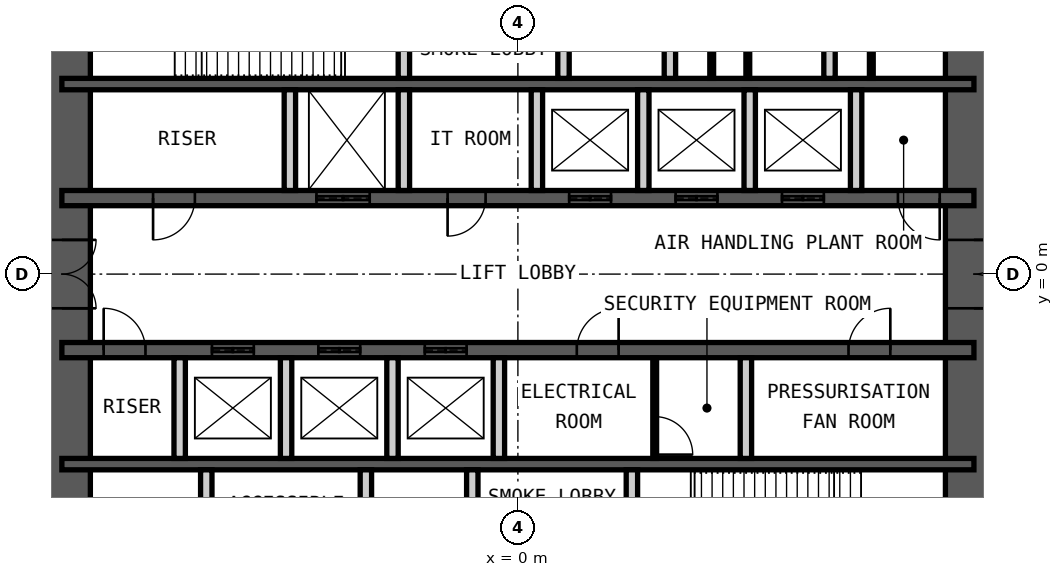
"""IFC4 building model, lengths in metres.
Left out: names, types, materials, properties, quantities, classifications, styles, units other than length and angle.
Written with IfcOpenShell. Run it as: python <this file> out.ifc"""

import sys

from ifc_helpers import new_model, si_unit, direction, frame, frame_2d, origin, place, context, subcontext, project, spatial, rectangle, extrude, element, fill, save


model = new_model("IFC4")
c1 = context("Model", 3, precision=1e-05, world=origin(), true_north=direction((0.0, 1.0)))
c2 = subcontext(c1, "Body", "Model", "MODEL_VIEW")
j1 = project(units=[si_unit("LENGTHUNIT", "METRE"), si_unit("PLANEANGLEUNIT", "RADIAN")], contexts=[c1])
p1 = place(None, origin())
s1 = spatial("IfcSite", under=j1, at=p1, CompositionType="ELEMENT")
p2 = place(p1, origin())
s2 = spatial("IfcBuilding", under=s1, at=p2, CompositionType="ELEMENT")
p3 = place(p2, origin())
s3 = spatial("IfcBuildingStorey", under=s2, at=p3, CompositionType="ELEMENT", Elevation=0.0)
p4 = place(p3, frame((12.0, -9.0, 0.0), z_axis=(0.0, 0.0, 1.0), x_axis=(0.0, 1.0, 0.0)))
e1 = element("IfcWall", 1, at=p4, inside=s3, PredefinedType="SHEAR", context=c2, shape_type="SweptSolid", body=[
    extrude(rectangle(XDim=18.0, YDim=1.5, at=frame_2d((9.0, 0.0))), origin(), (0.0, 0.0, 1.0), 6.0),
])
p5 = place(p4, frame((8.1, 0.0, 0.0)))
e2 = element("IfcOpeningElement", 2, at=p5, cuts=e1, PredefinedType="OPENING", context=c2, shape_type="SweptSolid", body=[
    extrude(rectangle(XDim=1.8, YDim=2.1, at=frame_2d((0.9, 1.05))), frame((0.0, 0.76, 0.0), z_axis=(0.0, -1.0, 0.0), x_axis=(1.0, 0.0, 0.0)), (0.0, 0.0, 1.0), 1.52),
])
p6 = place(p3, frame((-12.0, -9.0, 0.0), z_axis=(0.0, 0.0, 1.0), x_axis=(0.0, 1.0, 0.0)))
e3 = element("IfcWall", 3, at=p6, inside=s3, PredefinedType="SHEAR", context=c2, shape_type="SweptSolid", body=[
    extrude(rectangle(XDim=18.0, YDim=1.5, at=frame_2d((9.0, 0.0))), origin(), (0.0, 0.0, 1.0), 6.0),
])
p7 = place(p6, frame((8.1, 0.0, 0.0)))
e4 = element("IfcOpeningElement", 4, at=p7, cuts=e3, PredefinedType="OPENING", context=c2, shape_type="SweptSolid", body=[
    extrude(rectangle(XDim=1.8, YDim=2.1, at=frame_2d((0.9, 1.05))), frame((0.0, 0.76, 0.0), z_axis=(0.0, -1.0, 0.0), x_axis=(1.0, 0.0, 0.0)), (0.0, 0.0, 1.0), 1.52),
])
p8 = place(p3, frame((-12.0, 5.0, 0.0), z_axis=(0.0, 0.0, 1.0), x_axis=(1.0, 0.0, 0.0)))
e5 = element("IfcWall", 5, at=p8, inside=s3, PredefinedType="SHEAR", context=c2, shape_type="SweptSolid", body=[
    extrude(rectangle(XDim=24.0, YDim=0.3, at=frame_2d((12.0, 0.0))), origin(), (0.0, 0.0, 1.0), 6.0),
])
p9 = place(p3, frame((-12.0, 2.0, 0.0), z_axis=(0.0, 0.0, 1.0), x_axis=(1.0, 0.0, 0.0)))
e6 = element("IfcWall", 6, at=p9, inside=s3, PredefinedType="SHEAR", context=c2, shape_type="SweptSolid", body=[
    extrude(rectangle(XDim=24.0, YDim=0.4, at=frame_2d((12.0, 0.0))), origin(), (0.0, 0.0, 1.0), 6.0),
])
p10 = place(p9, frame((2.4, 0.0, 0.0)))
e7 = element("IfcOpeningElement", 7, at=p10, cuts=e6, PredefinedType="OPENING", context=c2, shape_type="SweptSolid", body=[
    extrude(rectangle(XDim=1.1, YDim=2.1, at=frame_2d((0.55, 1.05))), frame((0.0, 0.21, 0.0), z_axis=(0.0, -1.0, 0.0), x_axis=(1.0, 0.0, 0.0)), (0.0, 0.0, 1.0), 0.42),
])
p11 = place(p9, frame((22.0, 0.0, 0.0)))
e8 = element("IfcOpeningElement", 8, at=p11, cuts=e6, PredefinedType="OPENING", context=c2, shape_type="SweptSolid", body=[
    extrude(rectangle(XDim=1.1, YDim=2.1, at=frame_2d((0.55, 1.05))), frame((0.0, 0.21, 0.0), z_axis=(0.0, -1.0, 0.0), x_axis=(1.0, 0.0, 0.0)), (0.0, 0.0, 1.0), 0.42),
])
p12 = place(p9, frame((10.15, 0.0, 0.0)))
e9 = element("IfcOpeningElement", 9, at=p12, cuts=e6, PredefinedType="OPENING", context=c2, shape_type="SweptSolid", body=[
    extrude(rectangle(XDim=1.0, YDim=2.1, at=frame_2d((0.5, 1.05))), frame((0.0, 0.21, 0.0), z_axis=(0.0, -1.0, 0.0), x_axis=(1.0, 0.0, 0.0)), (0.0, 0.0, 1.0), 0.42),
])
p13 = place(p9, frame((6.7, 0.0, 0.0)))
e10 = element("IfcOpeningElement", 10, at=p13, cuts=e6, PredefinedType="OPENING", context=c2, shape_type="SweptSolid", body=[
    extrude(rectangle(XDim=1.4, YDim=2.4, at=frame_2d((0.7, 1.2))), frame((0.0, 0.21, 0.0), z_axis=(0.0, -1.0, 0.0), x_axis=(1.0, 0.0, 0.0)), (0.0, 0.0, 1.0), 0.42),
])
p14 = place(p9, frame((13.35, 0.0, 0.0)))
e11 = element("IfcOpeningElement", 11, at=p14, cuts=e6, PredefinedType="OPENING", context=c2, shape_type="SweptSolid", body=[
    extrude(rectangle(XDim=1.1, YDim=2.4, at=frame_2d((0.55, 1.2))), frame((0.0, 0.21, 0.0), z_axis=(0.0, -1.0, 0.0), x_axis=(1.0, 0.0, 0.0)), (0.0, 0.0, 1.0), 0.42),
])
p15 = place(p9, frame((16.15, 0.0, 0.0)))
e12 = element("IfcOpeningElement", 12, at=p15, cuts=e6, PredefinedType="OPENING", context=c2, shape_type="SweptSolid", body=[
    extrude(rectangle(XDim=1.1, YDim=2.4, at=frame_2d((0.55, 1.2))), frame((0.0, 0.21, 0.0), z_axis=(0.0, -1.0, 0.0), x_axis=(1.0, 0.0, 0.0)), (0.0, 0.0, 1.0), 0.42),
])
p16 = place(p9, frame((18.95, 0.0, 0.0)))
e13 = element("IfcOpeningElement", 13, at=p16, cuts=e6, PredefinedType="OPENING", context=c2, shape_type="SweptSolid", body=[
    extrude(rectangle(XDim=1.1, YDim=2.4, at=frame_2d((0.55, 1.2))), frame((0.0, 0.21, 0.0), z_axis=(0.0, -1.0, 0.0), x_axis=(1.0, 0.0, 0.0)), (0.0, 0.0, 1.0), 0.42),
])
p17 = place(p3, frame((-12.0, -2.0, 0.0), z_axis=(0.0, 0.0, 1.0), x_axis=(1.0, 0.0, 0.0)))
e14 = element("IfcWall", 14, at=p17, inside=s3, PredefinedType="SHEAR", context=c2, shape_type="SweptSolid", body=[
    extrude(rectangle(XDim=24.0, YDim=0.4, at=frame_2d((12.0, 0.0))), origin(), (0.0, 0.0, 1.0), 6.0),
])
p18 = place(p17, frame((1.1, 0.0, 0.0)))
e15 = element("IfcOpeningElement", 15, at=p18, cuts=e14, PredefinedType="OPENING", context=c2, shape_type="SweptSolid", body=[
    extrude(rectangle(XDim=1.1, YDim=2.1, at=frame_2d((0.55, 1.05))), frame((0.0, 0.21, 0.0), z_axis=(0.0, -1.0, 0.0), x_axis=(1.0, 0.0, 0.0)), (0.0, 0.0, 1.0), 0.42),
])
p19 = place(p17, frame((13.55, 0.0, 0.0)))
e16 = element("IfcOpeningElement", 16, at=p19, cuts=e14, PredefinedType="OPENING", context=c2, shape_type="SweptSolid", body=[
    extrude(rectangle(XDim=1.1, YDim=2.1, at=frame_2d((0.55, 1.05))), frame((0.0, 0.21, 0.0), z_axis=(0.0, -1.0, 0.0), x_axis=(1.0, 0.0, 0.0)), (0.0, 0.0, 1.0), 0.42),
])
p20 = place(p17, frame((20.7, 0.0, 0.0)))
e17 = element("IfcOpeningElement", 17, at=p20, cuts=e14, PredefinedType="OPENING", context=c2, shape_type="SweptSolid", body=[
    extrude(rectangle(XDim=1.1, YDim=2.1, at=frame_2d((0.55, 1.05))), frame((0.0, 0.21, 0.0), z_axis=(0.0, -1.0, 0.0), x_axis=(1.0, 0.0, 0.0)), (0.0, 0.0, 1.0), 0.42),
])
p21 = place(p17, frame((3.95, 0.0, 0.0)))
e18 = element("IfcOpeningElement", 18, at=p21, cuts=e14, PredefinedType="OPENING", context=c2, shape_type="SweptSolid", body=[
    extrude(rectangle(XDim=1.1, YDim=2.4, at=frame_2d((0.55, 1.2))), frame((0.0, 0.21, 0.0), z_axis=(0.0, -1.0, 0.0), x_axis=(1.0, 0.0, 0.0)), (0.0, 0.0, 1.0), 0.42),
])
p22 = place(p17, frame((6.75, 0.0, 0.0)))
e19 = element("IfcOpeningElement", 19, at=p22, cuts=e14, PredefinedType="OPENING", context=c2, shape_type="SweptSolid", body=[
    extrude(rectangle(XDim=1.1, YDim=2.4, at=frame_2d((0.55, 1.2))), frame((0.0, 0.21, 0.0), z_axis=(0.0, -1.0, 0.0), x_axis=(1.0, 0.0, 0.0)), (0.0, 0.0, 1.0), 0.42),
])
p23 = place(p17, frame((9.55, 0.0, 0.0)))
e20 = element("IfcOpeningElement", 20, at=p23, cuts=e14, PredefinedType="OPENING", context=c2, shape_type="SweptSolid", body=[
    extrude(rectangle(XDim=1.1, YDim=2.4, at=frame_2d((0.55, 1.2))), frame((0.0, 0.21, 0.0), z_axis=(0.0, -1.0, 0.0), x_axis=(1.0, 0.0, 0.0)), (0.0, 0.0, 1.0), 0.42),
])
p24 = place(p3, frame((-12.0, -5.0, 0.0), z_axis=(0.0, 0.0, 1.0), x_axis=(1.0, 0.0, 0.0)))
e21 = element("IfcWall", 21, at=p24, inside=s3, PredefinedType="SHEAR", context=c2, shape_type="SweptSolid", body=[
    extrude(rectangle(XDim=24.0, YDim=0.3, at=frame_2d((12.0, 0.0))), origin(), (0.0, 0.0, 1.0), 6.0),
])
p25 = place(p3, frame((-3.0, 5.15, 0.0), z_axis=(0.0, 0.0, 1.0), x_axis=(0.0, 1.0, 0.0)))
e22 = element("IfcWall", 22, at=p25, inside=s3, PredefinedType="PARTITIONING", context=c2, shape_type="SweptSolid", body=[
    extrude(rectangle(XDim=3.85, YDim=0.3, at=frame_2d((1.925, 0.0))), origin(), (0.0, 0.0, 1.0), 5.78),
])
p26 = place(p25, frame((1.425, 0.0, 0.0)))
e23 = element("IfcOpeningElement", 23, at=p26, cuts=e22, PredefinedType="OPENING", context=c2, shape_type="SweptSolid", body=[
    extrude(rectangle(XDim=1.0, YDim=2.1, at=frame_2d((0.5, 1.05))), frame((0.0, 0.16, 0.0), z_axis=(0.0, -1.0, 0.0), x_axis=(1.0, 0.0, 0.0)), (0.0, 0.0, 1.0), 0.32),
])
p27 = place(p3, frame((1.2, 5.15, 0.0), z_axis=(0.0, 0.0, 1.0), x_axis=(0.0, 1.0, 0.0)))
e24 = element("IfcWall", 24, at=p27, inside=s3, PredefinedType="PARTITIONING", context=c2, shape_type="SweptSolid", body=[
    extrude(rectangle(XDim=3.85, YDim=0.3, at=frame_2d((1.925, 0.0))), origin(), (0.0, 0.0, 1.0), 5.78),
])
p28 = place(p27, frame((1.375, 0.0, 0.0)))
e25 = element("IfcOpeningElement", 25, at=p28, cuts=e24, PredefinedType="OPENING", context=c2, shape_type="SweptSolid", body=[
    extrude(rectangle(XDim=1.1, YDim=2.4, at=frame_2d((0.55, 1.2))), frame((0.0, 0.16, 0.0), z_axis=(0.0, -1.0, 0.0), x_axis=(1.0, 0.0, 0.0)), (0.0, 0.0, 1.0), 0.32),
])
for number, where, z_axis, x_axis in (
    (26, (4.0, 5.15, 0.0), (0.0, 0.0, 1.0), (0.0, 1.0, 0.0)),
    (27, (8.2, 5.15, 0.0), (0.0, 0.0, 1.0), (0.0, 1.0, 0.0)),
):
    element("IfcWall", number, at=place(p3, frame(where, z_axis=z_axis, x_axis=x_axis)), inside=s3, PredefinedType="PARTITIONING", context=c2, shape_type="SweptSolid", body=[
        extrude(rectangle(XDim=3.85, YDim=0.3, at=frame_2d((1.925, 0.0))), origin(), (0.0, 0.0, 1.0), 5.78),
    ])
for number, where, z_axis, x_axis in (
    (28, (-6.0, 2.2, 0.0), (0.0, 0.0, 1.0), (0.0, 1.0, 0.0)),
    (29, (-3.0, 2.2, 0.0), (0.0, 0.0, 1.0), (0.0, 1.0, 0.0)),
    (30, (0.5, 2.2, 0.0), (0.0, 0.0, 1.0), (0.0, 1.0, 0.0)),
    (31, (3.3, 2.2, 0.0), (0.0, 0.0, 1.0), (0.0, 1.0, 0.0)),
    (32, (6.1, 2.2, 0.0), (0.0, 0.0, 1.0), (0.0, 1.0, 0.0)),
    (33, (8.9, 2.2, 0.0), (0.0, 0.0, 1.0), (0.0, 1.0, 0.0)),
    (34, (-8.9, -4.85, 0.0), (0.0, 0.0, 1.0), (0.0, 1.0, 0.0)),
    (35, (-6.1, -4.85, 0.0), (0.0, 0.0, 1.0), (0.0, 1.0, 0.0)),
    (36, (-3.3, -4.85, 0.0), (0.0, 0.0, 1.0), (0.0, 1.0, 0.0)),
    (37, (-0.5, -4.85, 0.0), (0.0, 0.0, 1.0), (0.0, 1.0, 0.0)),
    (38, (6.0, -4.85, 0.0), (0.0, 0.0, 1.0), (0.0, 1.0, 0.0)),
):
    element("IfcWall", number, at=place(p3, frame(where, z_axis=z_axis, x_axis=x_axis)), inside=s3, PredefinedType="PARTITIONING", context=c2, shape_type="SweptSolid", body=[
        extrude(rectangle(XDim=2.65, YDim=0.3, at=frame_2d((1.325, 0.0))), origin(), (0.0, 0.0, 1.0), 5.78),
    ])
for number, where, z_axis, x_axis in (
    (39, (-8.2, -9.0, 0.0), (0.0, 0.0, 1.0), (0.0, 1.0, 0.0)),
    (40, (-4.0, -9.0, 0.0), (0.0, 0.0, 1.0), (0.0, 1.0, 0.0)),
):
    element("IfcWall", number, at=place(p3, frame(where, z_axis=z_axis, x_axis=x_axis)), inside=s3, PredefinedType="PARTITIONING", context=c2, shape_type="SweptSolid", body=[
        extrude(rectangle(XDim=3.85, YDim=0.3, at=frame_2d((1.925, 0.0))), origin(), (0.0, 0.0, 1.0), 5.78),
    ])
p29 = place(p3, frame((-1.2, -9.0, 0.0), z_axis=(0.0, 0.0, 1.0), x_axis=(0.0, 1.0, 0.0)))
e41 = element("IfcWall", 41, at=p29, inside=s3, PredefinedType="PARTITIONING", context=c2, shape_type="SweptSolid", body=[
    extrude(rectangle(XDim=3.85, YDim=0.3, at=frame_2d((1.925, 0.0))), origin(), (0.0, 0.0, 1.0), 5.78),
])
p30 = place(p29, frame((1.375, 0.0, 0.0)))
e42 = element("IfcOpeningElement", 42, at=p30, cuts=e41, PredefinedType="OPENING", context=c2, shape_type="SweptSolid", body=[
    extrude(rectangle(XDim=1.1, YDim=2.4, at=frame_2d((0.55, 1.2))), frame((0.0, 0.16, 0.0), z_axis=(0.0, -1.0, 0.0), x_axis=(1.0, 0.0, 0.0)), (0.0, 0.0, 1.0), 0.32),
])
p31 = place(p3, frame((3.0, -9.0, 0.0), z_axis=(0.0, 0.0, 1.0), x_axis=(0.0, 1.0, 0.0)))
e43 = element("IfcWall", 43, at=p31, inside=s3, PredefinedType="PARTITIONING", context=c2, shape_type="SweptSolid", body=[
    extrude(rectangle(XDim=3.85, YDim=0.3, at=frame_2d((1.925, 0.0))), origin(), (0.0, 0.0, 1.0), 5.78),
])
p32 = place(p31, frame((1.425, 0.0, 0.0)))
e44 = element("IfcOpeningElement", 44, at=p32, cuts=e43, PredefinedType="OPENING", context=c2, shape_type="SweptSolid", body=[
    extrude(rectangle(XDim=1.0, YDim=2.1, at=frame_2d((0.5, 1.05))), frame((0.0, 0.16, 0.0), z_axis=(0.0, -1.0, 0.0), x_axis=(1.0, 0.0, 0.0)), (0.0, 0.0, 1.0), 0.32),
])
p33 = place(p3, frame((3.6, -4.85, 0.0), z_axis=(0.0, 0.0, 1.0), x_axis=(0.0, 1.0, 0.0)))
e45 = element("IfcWall", 45, at=p33, inside=s3, PredefinedType="PARTITIONING", context=c2, shape_type="SweptSolid", body=[
    extrude(rectangle(XDim=2.65, YDim=0.1, at=frame_2d((1.325, 0.0))), origin(), (0.0, 0.0, 1.0), 5.78),
])
p34 = place(p33, frame((0.1, 0.0, 0.0)))
e46 = element("IfcOpeningElement", 46, at=p34, cuts=e45, PredefinedType="OPENING", context=c2, shape_type="SweptSolid", body=[
    extrude(rectangle(XDim=1.0, YDim=2.4, at=frame_2d((0.5, 1.2))), frame((0.0, 0.06, 0.0), z_axis=(0.0, -1.0, 0.0), x_axis=(1.0, 0.0, 0.0)), (0.0, 0.0, 1.0), 0.12),
])
for number, where, z_axis, x_axis in (
    (47, (5.1, 5.15, 0.0), (0.0, 0.0, 1.0), (0.0, 1.0, 0.0)),
    (48, (6.05, 5.15, 0.0), (0.0, 0.0, 1.0), (0.0, 1.0, 0.0)),
    (49, (9.3, 5.15, 0.0), (0.0, 0.0, 1.0), (0.0, 1.0, 0.0)),
):
    element("IfcWall", number, at=place(p3, frame(where, z_axis=z_axis, x_axis=x_axis)), inside=s3, PredefinedType="PARTITIONING", context=c2, shape_type="SweptSolid", body=[
        extrude(rectangle(XDim=1.5, YDim=0.1, at=frame_2d((0.75, 0.0))), origin(), (0.0, 0.0, 1.0), 2.1),
    ])
p35 = place(p10, origin())
e50 = element("IfcDoor", 50, at=p35, inside=s3, OperationType="SINGLE_SWING_LEFT", PredefinedType="DOOR", context=c2, shape_type="SweptSolid", body=[
    extrude(rectangle(XDim=1.1, YDim=2.1, at=frame_2d((0.55, 1.05))), frame((0.0, 0.025, 0.0), z_axis=(0.0, -1.0, 0.0), x_axis=(1.0, 0.0, 0.0)), (0.0, 0.0, 1.0), 0.05),
])
fill(e7, e50)
p36 = place(p18, origin())
e51 = element("IfcDoor", 51, at=p36, inside=s3, OperationType="SINGLE_SWING_RIGHT", PredefinedType="DOOR", context=c2, shape_type="SweptSolid", body=[
    extrude(rectangle(XDim=1.1, YDim=2.1, at=frame_2d((0.55, 1.05))), frame((0.0, 0.025, 0.0), z_axis=(0.0, -1.0, 0.0), x_axis=(1.0, 0.0, 0.0)), (0.0, 0.0, 1.0), 0.05),
])
fill(e15, e51)
p37 = place(p11, origin())
e52 = element("IfcDoor", 52, at=p37, inside=s3, OperationType="SINGLE_SWING_RIGHT", PredefinedType="DOOR", context=c2, shape_type="SweptSolid", body=[
    extrude(rectangle(XDim=1.1, YDim=2.1, at=frame_2d((0.55, 1.05))), frame((0.0, 0.025, 0.0), z_axis=(0.0, -1.0, 0.0), x_axis=(1.0, 0.0, 0.0)), (0.0, 0.0, 1.0), 0.05),
])
fill(e8, e52)
p38 = place(p12, origin())
e53 = element("IfcDoor", 53, at=p38, inside=s3, OperationType="SINGLE_SWING_LEFT", PredefinedType="DOOR", context=c2, shape_type="SweptSolid", body=[
    extrude(rectangle(XDim=1.0, YDim=2.1, at=frame_2d((0.5, 1.05))), frame((0.0, 0.025, 0.0), z_axis=(0.0, -1.0, 0.0), x_axis=(1.0, 0.0, 0.0)), (0.0, 0.0, 1.0), 0.05),
])
fill(e9, e53)
p39 = place(p19, origin())
e54 = element("IfcDoor", 54, at=p39, inside=s3, OperationType="SINGLE_SWING_LEFT", PredefinedType="DOOR", context=c2, shape_type="SweptSolid", body=[
    extrude(rectangle(XDim=1.1, YDim=2.1, at=frame_2d((0.55, 1.05))), frame((0.0, 0.025, 0.0), z_axis=(0.0, -1.0, 0.0), x_axis=(1.0, 0.0, 0.0)), (0.0, 0.0, 1.0), 0.05),
])
fill(e16, e54)
p40 = place(p20, origin())
e55 = element("IfcDoor", 55, at=p40, inside=s3, OperationType="SINGLE_SWING_LEFT", PredefinedType="DOOR", context=c2, shape_type="SweptSolid", body=[
    extrude(rectangle(XDim=1.1, YDim=2.1, at=frame_2d((0.55, 1.05))), frame((0.0, 0.025, 0.0), z_axis=(0.0, -1.0, 0.0), x_axis=(1.0, 0.0, 0.0)), (0.0, 0.0, 1.0), 0.05),
])
fill(e17, e55)
p41 = place(p5, origin())
e56 = element("IfcDoor", 56, at=p41, inside=s3, OperationType="DOUBLE_DOOR_DOUBLE_SWING", PredefinedType="DOOR", context=c2, shape_type="SweptSolid", body=[
    extrude(rectangle(XDim=1.8, YDim=2.1, at=frame_2d((0.9, 1.05))), frame((0.0, 0.025, 0.0), z_axis=(0.0, -1.0, 0.0), x_axis=(1.0, 0.0, 0.0)), (0.0, 0.0, 1.0), 0.05),
])
fill(e2, e56)
p42 = place(p7, origin())
e57 = element("IfcDoor", 57, at=p42, inside=s3, OperationType="DOUBLE_DOOR_DOUBLE_SWING", PredefinedType="DOOR", context=c2, shape_type="SweptSolid", body=[
    extrude(rectangle(XDim=1.8, YDim=2.1, at=frame_2d((0.9, 1.05))), frame((0.0, 0.025, 0.0), z_axis=(0.0, -1.0, 0.0), x_axis=(1.0, 0.0, 0.0)), (0.0, 0.0, 1.0), 0.05),
])
fill(e4, e57)
p43 = place(p13, origin())
e58 = element("IfcDoor", 58, at=p43, inside=s3, OperationType="DOUBLE_DOOR_SLIDING", PredefinedType="DOOR", context=c2, shape_type="SweptSolid", body=[
    extrude(rectangle(XDim=1.4, YDim=2.4, at=frame_2d((0.7, 1.2))), frame((0.0, 0.025, 0.0), z_axis=(0.0, -1.0, 0.0), x_axis=(1.0, 0.0, 0.0)), (0.0, 0.0, 1.0), 0.05),
])
fill(e10, e58)
p44 = place(p14, origin())
e59 = element("IfcDoor", 59, at=p44, inside=s3, OperationType="DOUBLE_DOOR_SLIDING", PredefinedType="DOOR", context=c2, shape_type="SweptSolid", body=[
    extrude(rectangle(XDim=1.1, YDim=2.4, at=frame_2d((0.55, 1.2))), frame((0.0, 0.025, 0.0), z_axis=(0.0, -1.0, 0.0), x_axis=(1.0, 0.0, 0.0)), (0.0, 0.0, 1.0), 0.05),
])
fill(e11, e59)
p45 = place(p15, origin())
e60 = element("IfcDoor", 60, at=p45, inside=s3, OperationType="DOUBLE_DOOR_SLIDING", PredefinedType="DOOR", context=c2, shape_type="SweptSolid", body=[
    extrude(rectangle(XDim=1.1, YDim=2.4, at=frame_2d((0.55, 1.2))), frame((0.0, 0.025, 0.0), z_axis=(0.0, -1.0, 0.0), x_axis=(1.0, 0.0, 0.0)), (0.0, 0.0, 1.0), 0.05),
])
fill(e12, e60)
p46 = place(p16, origin())
e61 = element("IfcDoor", 61, at=p46, inside=s3, OperationType="DOUBLE_DOOR_SLIDING", PredefinedType="DOOR", context=c2, shape_type="SweptSolid", body=[
    extrude(rectangle(XDim=1.1, YDim=2.4, at=frame_2d((0.55, 1.2))), frame((0.0, 0.025, 0.0), z_axis=(0.0, -1.0, 0.0), x_axis=(1.0, 0.0, 0.0)), (0.0, 0.0, 1.0), 0.05),
])
fill(e13, e61)
p47 = place(p21, origin())
e62 = element("IfcDoor", 62, at=p47, inside=s3, OperationType="DOUBLE_DOOR_SLIDING", PredefinedType="DOOR", context=c2, shape_type="SweptSolid", body=[
    extrude(rectangle(XDim=1.1, YDim=2.4, at=frame_2d((0.55, 1.2))), frame((0.0, 0.025, 0.0), z_axis=(0.0, -1.0, 0.0), x_axis=(1.0, 0.0, 0.0)), (0.0, 0.0, 1.0), 0.05),
])
fill(e18, e62)
p48 = place(p22, origin())
e63 = element("IfcDoor", 63, at=p48, inside=s3, OperationType="DOUBLE_DOOR_SLIDING", PredefinedType="DOOR", context=c2, shape_type="SweptSolid", body=[
    extrude(rectangle(XDim=1.1, YDim=2.4, at=frame_2d((0.55, 1.2))), frame((0.0, 0.025, 0.0), z_axis=(0.0, -1.0, 0.0), x_axis=(1.0, 0.0, 0.0)), (0.0, 0.0, 1.0), 0.05),
])
fill(e19, e63)
p49 = place(p23, origin())
e64 = element("IfcDoor", 64, at=p49, inside=s3, OperationType="DOUBLE_DOOR_SLIDING", PredefinedType="DOOR", context=c2, shape_type="SweptSolid", body=[
    extrude(rectangle(XDim=1.1, YDim=2.4, at=frame_2d((0.55, 1.2))), frame((0.0, 0.025, 0.0), z_axis=(0.0, -1.0, 0.0), x_axis=(1.0, 0.0, 0.0)), (0.0, 0.0, 1.0), 0.05),
])
fill(e20, e64)
p50 = place(p34, origin())
e65 = element("IfcDoor", 65, at=p50, inside=s3, OperationType="SINGLE_SWING_LEFT", PredefinedType="DOOR", context=c2, shape_type="SweptSolid", body=[
    extrude(rectangle(XDim=1.0, YDim=2.4, at=frame_2d((0.5, 1.2))), frame((0.0, 0.025, 0.0), z_axis=(0.0, -1.0, 0.0), x_axis=(1.0, 0.0, 0.0)), (0.0, 0.0, 1.0), 0.05),
])
fill(e46, e65)
save(model, sys.argv[1])
